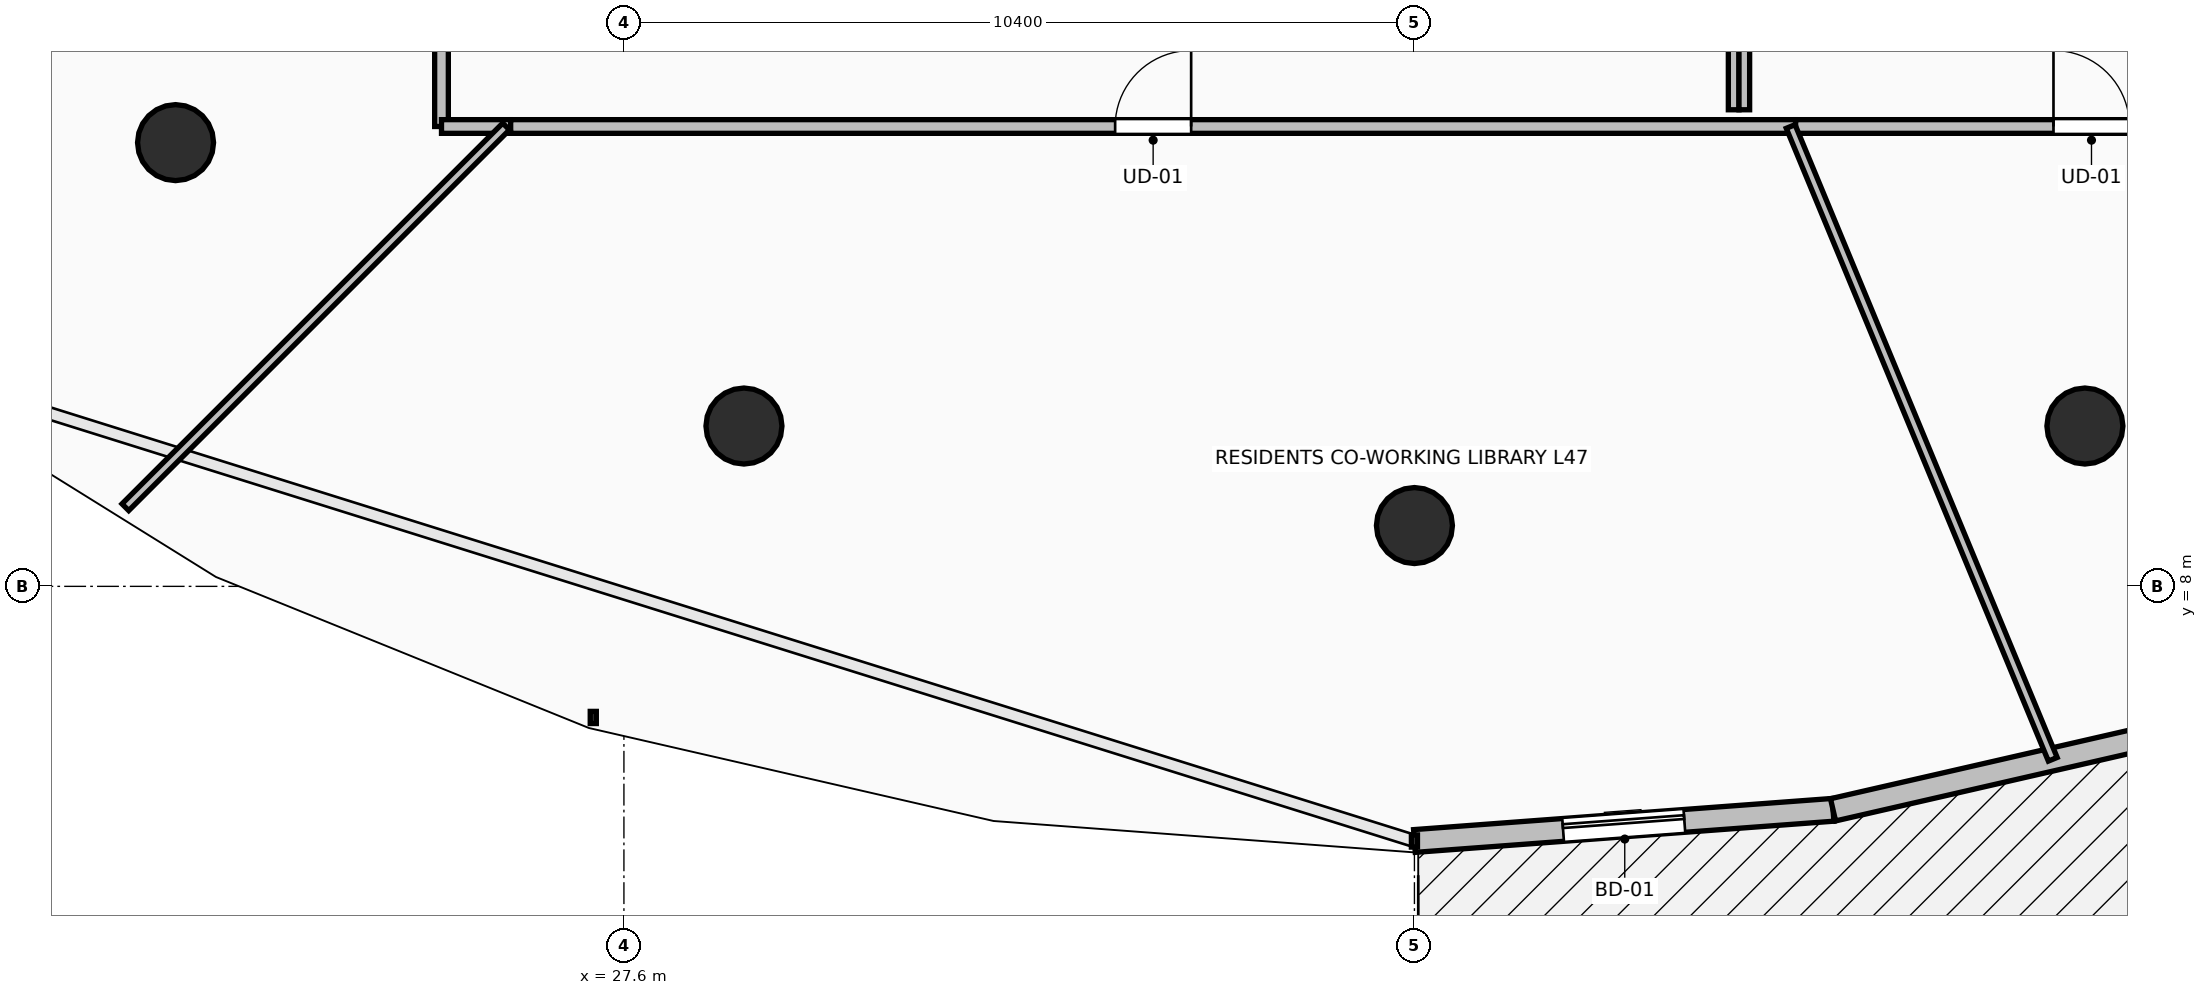
"""IFC4 building model, lengths in metres.
Left out: names, types, materials, properties, quantities, classifications, styles, units other than length and angle.
Written with IfcOpenShell. Run it as: python <this file> out.ifc"""

import sys

from ifc_helpers import new_model, si_unit, direction, frame, frame_2d, origin, origin_2d, place, context, subcontext, project, spatial, rectangle, circle, extrude, element, fill, save


model = new_model("IFC4")
c1 = context("Model", 3, precision=1e-05, world=origin(), true_north=direction((0.0, 1.0)))
c2 = subcontext(c1, "Body", "Model", "MODEL_VIEW")
j1 = project(units=[si_unit("LENGTHUNIT", "METRE"), si_unit("PLANEANGLEUNIT", "RADIAN")], contexts=[c1])
p1 = place(None, origin())
s1 = spatial("IfcSite", under=j1, at=p1, CompositionType="ELEMENT")
p2 = place(p1, origin())
s2 = spatial("IfcBuilding", under=s1, at=p2, CompositionType="ELEMENT")
p3 = place(p2, frame((0.0, 0.0, 174.6)))
s3 = spatial("IfcBuildingStorey", under=s2, at=p3, CompositionType="ELEMENT", Elevation=174.6)
for number, where, z_axis, x_axis in (
    (1, (21.701, 13.838, 0.0), (0.0, 0.0, 1.0), (-0.707, -0.707, 0.0)),
    (2, (29.179, 10.109, 0.0), (0.0, 0.0, 1.0), (-0.383, -0.924, 0.0)),
    (3, (38.0, 8.8, 0.0), (0.0, 0.0, 1.0), (0.0, -1.0, 0.0)),
    (4, (46.821, 10.109, 0.0), (0.0, 0.0, 1.0), (0.383, -0.924, 0.0)),
):
    element("IfcColumn", number, at=place(p3, frame(where, z_axis=z_axis, x_axis=x_axis)), inside=s3, PredefinedType="COLUMN", context=c2, shape_type="SweptSolid", body=[
        extrude(circle(Radius=0.5, at=origin_2d()), origin(), (0.0, 0.0, 1.0), 4.5),
    ])
p4 = place(p3, frame((38.0, 4.65, 0.0), z_axis=(0.0, 0.0, 1.0), x_axis=(0.997234968529, 0.074312970214, 0.0)))
e5 = element("IfcWall", 5, at=p4, inside=s3, PredefinedType="STANDARD", context=c2, shape_type="SweptSolid", body=[
    extrude(rectangle(XDim=5.523, YDim=0.3, at=frame_2d((2.761, 0.0))), origin(), (0.0, 0.0, 1.0), 4.24),
])
p5 = place(p4, frame((1.961, 0.0, 0.0)))
e6 = element("IfcOpeningElement", 6, at=p5, cuts=e5, PredefinedType="OPENING", context=c2, shape_type="SweptSolid", body=[
    extrude(rectangle(XDim=1.6, YDim=2.3, at=frame_2d((0.8, 1.15))), frame((0.0, 0.165, 0.0), z_axis=(0.0, -1.0, 0.0), x_axis=(1.0, 0.0, 0.0)), (0.0, 0.0, 1.0), 0.33),
])
p6 = place(p3, frame((43.507, 5.06, 0.0), z_axis=(0.0, 0.0, 1.0), x_axis=(0.974684194578, 0.223586047954, 0.0)))
e7 = element("IfcWall", 7, at=p6, inside=s3, PredefinedType="STANDARD", context=c2, shape_type="SweptSolid", body=[
    extrude(rectangle(XDim=5.433, YDim=0.3, at=frame_2d((2.717, 0.0))), origin(), (0.0, 0.0, 1.0), 4.24),
])
p7 = place(p3, frame((25.2, 24.55, 0.0), z_axis=(0.0, 0.0, 1.0), x_axis=(0.0, -1.0, 0.0)))
e8 = element("IfcWall", 8, at=p7, inside=s3, PredefinedType="PARTITIONING", context=c2, shape_type="SweptSolid", body=[
    extrude(rectangle(XDim=10.5, YDim=0.18, at=frame_2d((5.25, 0.0))), origin(), (0.0, 0.0, 1.0), 3.432),
])
p8 = place(p7, frame((4.75, 0.0, 0.0)))
e9 = element("IfcOpeningElement", 9, at=p8, cuts=e8, PredefinedType="OPENING", context=c2, shape_type="SweptSolid", body=[
    extrude(rectangle(XDim=1.0, YDim=2.15, at=frame_2d((0.5, 1.075))), frame((0.0, 0.105, 0.0), z_axis=(0.0, -1.0, 0.0), x_axis=(1.0, 0.0, 0.0)), (0.0, 0.0, 1.0), 0.21),
])
p9 = place(p3, frame((25.2, 14.05, 0.0), z_axis=(0.0, 0.0, 1.0), x_axis=(1.0, 0.0, 0.0)))
e10 = element("IfcWall", 10, at=p9, inside=s3, PredefinedType="PARTITIONING", context=c2, shape_type="SweptSolid", body=[
    extrude(rectangle(XDim=0.91, YDim=0.18, at=frame_2d((0.455, 0.0))), origin(), (0.0, 0.0, 1.0), 3.886),
])
p10 = place(p3, frame((26.11, 14.05, 0.0), z_axis=(0.0, 0.0, 1.0), x_axis=(1.0, 0.0, 0.0)))
e11 = element("IfcWall", 11, at=p10, inside=s3, PredefinedType="PARTITIONING", context=c2, shape_type="SweptSolid", body=[
    extrude(rectangle(XDim=16.905, YDim=0.18, at=frame_2d((8.452, 0.0))), origin(), (0.0, 0.0, 1.0), 3.432),
])
p11 = place(p10, frame((7.952, 0.0, 0.0)))
e12 = element("IfcOpeningElement", 12, at=p11, cuts=e11, PredefinedType="OPENING", context=c2, shape_type="SweptSolid", body=[
    extrude(rectangle(XDim=1.0, YDim=2.15, at=frame_2d((0.5, 1.075))), frame((0.0, 0.105, 0.0), z_axis=(0.0, -1.0, 0.0), x_axis=(1.0, 0.0, 0.0)), (0.0, 0.0, 1.0), 0.21),
])
p12 = place(p3, frame((43.015, 14.05, 0.0), z_axis=(0.0, 0.0, 1.0), x_axis=(1.0, 0.0, 0.0)))
e13 = element("IfcWall", 13, at=p12, inside=s3, PredefinedType="PARTITIONING", context=c2, shape_type="SweptSolid", body=[
    extrude(rectangle(XDim=7.785, YDim=0.18, at=frame_2d((3.893, 0.0))), origin(), (0.0, 0.0, 1.0), 3.432),
])
p13 = place(p12, frame((3.393, 0.0, 0.0)))
e14 = element("IfcOpeningElement", 14, at=p13, cuts=e13, PredefinedType="OPENING", context=c2, shape_type="SweptSolid", body=[
    extrude(rectangle(XDim=1.0, YDim=2.15, at=frame_2d((0.5, 1.075))), frame((0.0, 0.105, 0.0), z_axis=(0.0, -1.0, 0.0), x_axis=(1.0, 0.0, 0.0)), (0.0, 0.0, 1.0), 0.21),
])
p14 = place(p3, frame((21.041, 9.041, 0.0), z_axis=(0.0, 0.0, 1.0), x_axis=(0.707106781187, 0.707106781187, 0.0)))
e15 = element("IfcWall", 15, at=p14, inside=s3, PredefinedType="PARTITIONING", context=c2, shape_type="SweptSolid", body=[
    extrude(rectangle(XDim=7.084, YDim=0.125, at=frame_2d((3.542, 0.0))), origin(), (0.0, 0.0, 1.0), 3.728),
])
p15 = place(p3, frame((46.398, 5.725, 0.0), z_axis=(0.0, 0.0, 1.0), x_axis=(-0.382654101666, 0.923891681139, 0.0)))
e16 = element("IfcWall", 16, at=p15, inside=s3, PredefinedType="PARTITIONING", context=c2, shape_type="SweptSolid", body=[
    extrude(rectangle(XDim=9.011, YDim=0.125, at=frame_2d((4.505, 0.0))), origin(), (0.0, 0.0, 1.0), 3.432),
])
for number, where, z_axis, x_axis in (
    (17, (42.2, 16.1, 0.0), (0.0, 0.0, 1.0), (0.0, -1.0, 0.0)),
    (18, (42.34, 14.27, 0.0), (0.0, 0.0, 1.0), (0.0, 1.0, 0.0)),
):
    element("IfcWall", number, at=place(p3, frame(where, z_axis=z_axis, x_axis=x_axis)), inside=s3, PredefinedType="PARTITIONING", context=c2, shape_type="SweptSolid", body=[
        extrude(rectangle(XDim=1.83, YDim=0.14, at=frame_2d((0.915, 0.0))), origin(), (0.0, 0.0, 1.0), 3.929),
    ])
p16 = place(p5, origin())
e19 = element("IfcDoor", 19, at=p16, inside=s3, OperationType="SLIDING_TO_LEFT", PredefinedType="DOOR", context=c2, shape_type="SweptSolid", body=[
    extrude(rectangle(XDim=1.6, YDim=2.3, at=frame_2d((0.8, 1.15))), frame((0.0, 0.025, 0.0), z_axis=(0.0, -1.0, 0.0), x_axis=(1.0, 0.0, 0.0)), (0.0, 0.0, 1.0), 0.05),
])
fill(e6, e19)
p17 = place(p11, origin())
e20 = element("IfcDoor", 20, at=p17, inside=s3, OperationType="SINGLE_SWING_RIGHT", PredefinedType="DOOR", context=c2, shape_type="SweptSolid", body=[
    extrude(rectangle(XDim=1.0, YDim=2.15, at=frame_2d((0.5, 1.075))), frame((0.0, 0.025, 0.0), z_axis=(0.0, -1.0, 0.0), x_axis=(1.0, 0.0, 0.0)), (0.0, 0.0, 1.0), 0.05),
])
fill(e12, e20)
p18 = place(p13, origin())
e21 = element("IfcDoor", 21, at=p18, inside=s3, OperationType="SINGLE_SWING_LEFT", PredefinedType="DOOR", context=c2, shape_type="SweptSolid", body=[
    extrude(rectangle(XDim=1.0, YDim=2.15, at=frame_2d((0.5, 1.075))), frame((0.0, 0.025, 0.0), z_axis=(0.0, -1.0, 0.0), x_axis=(1.0, 0.0, 0.0)), (0.0, 0.0, 1.0), 0.05),
])
fill(e14, e21)
save(model, sys.argv[1])
